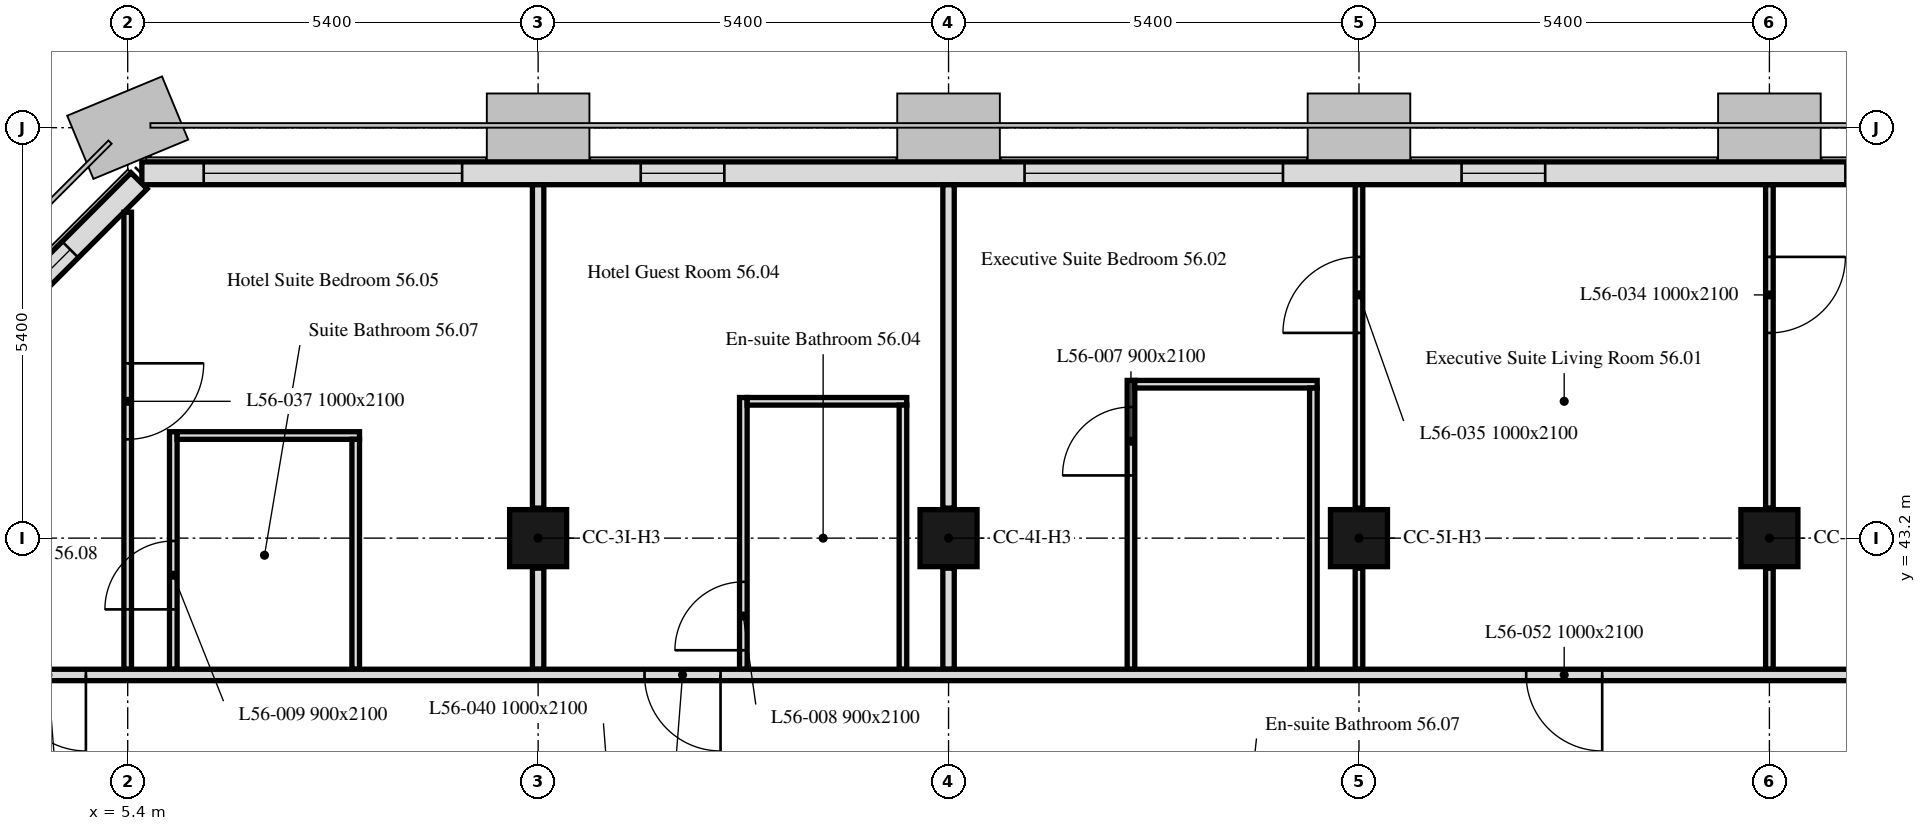
"""IFC4 building model, lengths in metres.
Left out: names, types, materials, properties, quantities, classifications, styles, units other than length and angle.
Written with IfcOpenShell. Run it as: python <this file> out.ifc"""

import sys

from ifc_helpers import new_model, si_unit, direction, frame, frame_2d, origin, origin_2d, place, context, subcontext, project, spatial, rectangle, extrude, element, fill, save


model = new_model("IFC4")
c1 = context("Model", 3, precision=1e-05, world=origin(), true_north=direction((0.0, 1.0)))
c2 = subcontext(c1, "Body", "Model", "MODEL_VIEW")
j1 = project(units=[si_unit("LENGTHUNIT", "METRE"), si_unit("PLANEANGLEUNIT", "RADIAN")], contexts=[c1])
p1 = place(None, origin())
s1 = spatial("IfcSite", under=j1, at=p1, CompositionType="ELEMENT")
p2 = place(p1, origin())
s2 = spatial("IfcBuilding", under=s1, at=p2, CompositionType="ELEMENT")
p3 = place(p2, frame((0.0, 0.0, 223.6)))
s3 = spatial("IfcBuildingStorey", under=s2, at=p3, CompositionType="ELEMENT", Elevation=223.6)
for number, where, z_axis, x_axis in (
    (1, (10.8, 43.2, 0.0), (0.0, 0.0, 1.0), (1.0, 0.0, 0.0)),
    (2, (16.2, 43.2, 0.0), (0.0, 0.0, 1.0), (1.0, 0.0, 0.0)),
    (3, (21.6, 43.2, 0.0), (0.0, 0.0, 1.0), (1.0, 0.0, 0.0)),
    (4, (27.0, 43.2, 0.0), (0.0, 0.0, 1.0), (1.0, 0.0, 0.0)),
):
    element("IfcColumn", number, at=place(p3, frame(where, z_axis=z_axis, x_axis=x_axis)), inside=s3, PredefinedType="COLUMN", context=c2, shape_type="SweptSolid", body=[
        extrude(rectangle(XDim=0.75, YDim=0.75, at=origin_2d()), origin(), (0.0, 0.0, 1.0), 3.0),
    ])
p4 = place(p3, frame((37.614, 48.0, 0.0), z_axis=(0.0, 0.0, 1.0), x_axis=(-1.0, 0.0, 0.0)))
e5 = element("IfcWall", 5, at=p4, inside=s3, PredefinedType="SOLIDWALL", context=c2, shape_type="SweptSolid", body=[
    extrude(rectangle(XDim=32.027, YDim=0.3, at=frame_2d((16.014, 0.0))), origin(), (0.0, 0.0, 1.0), 3.0),
])
p5 = place(p4, frame((2.764, 0.0, 0.9)))
e6 = element("IfcOpeningElement", 6, at=p5, cuts=e5, PredefinedType="OPENING", context=c2, shape_type="SweptSolid", body=[
    extrude(rectangle(XDim=1.1, YDim=1.7, at=frame_2d((0.55, 0.85))), frame((0.0, 0.16, 0.0), z_axis=(0.0, -1.0, 0.0), x_axis=(1.0, 0.0, 0.0)), (0.0, 0.0, 1.0), 0.32),
])
p6 = place(p4, frame((6.214, 0.0, 0.9)))
e7 = element("IfcOpeningElement", 7, at=p6, cuts=e5, PredefinedType="OPENING", context=c2, shape_type="SweptSolid", body=[
    extrude(rectangle(XDim=3.4, YDim=1.7, at=frame_2d((1.7, 0.85))), frame((0.0, 0.16, 0.0), z_axis=(0.0, -1.0, 0.0), x_axis=(1.0, 0.0, 0.0)), (0.0, 0.0, 1.0), 0.32),
])
p7 = place(p4, frame((13.564, 0.0, 0.9)))
e8 = element("IfcOpeningElement", 8, at=p7, cuts=e5, PredefinedType="OPENING", context=c2, shape_type="SweptSolid", body=[
    extrude(rectangle(XDim=1.1, YDim=1.7, at=frame_2d((0.55, 0.85))), frame((0.0, 0.16, 0.0), z_axis=(0.0, -1.0, 0.0), x_axis=(1.0, 0.0, 0.0)), (0.0, 0.0, 1.0), 0.32),
])
p8 = place(p4, frame((17.014, 0.0, 0.9)))
e9 = element("IfcOpeningElement", 9, at=p8, cuts=e5, PredefinedType="OPENING", context=c2, shape_type="SweptSolid", body=[
    extrude(rectangle(XDim=3.4, YDim=1.7, at=frame_2d((1.7, 0.85))), frame((0.0, 0.16, 0.0), z_axis=(0.0, -1.0, 0.0), x_axis=(1.0, 0.0, 0.0)), (0.0, 0.0, 1.0), 0.32),
])
p9 = place(p4, frame((24.364, 0.0, 0.9)))
e10 = element("IfcOpeningElement", 10, at=p9, cuts=e5, PredefinedType="OPENING", context=c2, shape_type="SweptSolid", body=[
    extrude(rectangle(XDim=1.1, YDim=1.7, at=frame_2d((0.55, 0.85))), frame((0.0, 0.16, 0.0), z_axis=(0.0, -1.0, 0.0), x_axis=(1.0, 0.0, 0.0)), (0.0, 0.0, 1.0), 0.32),
])
p10 = place(p4, frame((27.814, 0.0, 0.9)))
e11 = element("IfcOpeningElement", 11, at=p10, cuts=e5, PredefinedType="OPENING", context=c2, shape_type="SweptSolid", body=[
    extrude(rectangle(XDim=3.4, YDim=1.7, at=frame_2d((1.7, 0.85))), frame((0.0, 0.16, 0.0), z_axis=(0.0, -1.0, 0.0), x_axis=(1.0, 0.0, 0.0)), (0.0, 0.0, 1.0), 0.32),
])
p11 = place(p3, frame((5.55, 47.901, 0.0), z_axis=(0.0, 0.0, 1.0), x_axis=(-0.707106781187, -0.707106781187, 0.0)))
e12 = element("IfcWall", 12, at=p11, inside=s3, PredefinedType="SOLIDWALL", context=c2, shape_type="SweptSolid", body=[
    extrude(rectangle(XDim=6.86, YDim=0.3, at=frame_2d((3.43, 0.0))), origin(), (0.0, 0.0, 1.0), 3.0),
])
p12 = place(p11, frame((1.28, 0.0, 0.9)))
e13 = element("IfcOpeningElement", 13, at=p12, cuts=e12, PredefinedType="OPENING", context=c2, shape_type="SweptSolid", body=[
    extrude(rectangle(XDim=1.1, YDim=1.7, at=frame_2d((0.55, 0.85))), frame((0.0, 0.16, 0.0), z_axis=(0.0, -1.0, 0.0), x_axis=(1.0, 0.0, 0.0)), (0.0, 0.0, 1.0), 0.32),
])
p13 = place(p11, frame((4.48, 0.0, 0.9)))
e14 = element("IfcOpeningElement", 14, at=p13, cuts=e12, PredefinedType="OPENING", context=c2, shape_type="SweptSolid", body=[
    extrude(rectangle(XDim=1.1, YDim=1.7, at=frame_2d((0.55, 0.85))), frame((0.0, 0.16, 0.0), z_axis=(0.0, -1.0, 0.0), x_axis=(1.0, 0.0, 0.0)), (0.0, 0.0, 1.0), 0.32),
])
p14 = place(p3, frame((27.0, 47.849, 0.0), z_axis=(0.0, 0.0, 1.0), x_axis=(0.0, -1.0, 0.0)))
e15 = element("IfcWall", 15, at=p14, inside=s3, PredefinedType="PARTITIONING", context=c2, shape_type="SweptSolid", body=[
    extrude(rectangle(XDim=4.254, YDim=0.1, at=frame_2d((2.127, 0.0))), origin(), (0.0, 0.0, 1.0), 2.4),
])
p15 = place(p14, frame((0.949, 0.0, 0.0)))
e16 = element("IfcOpeningElement", 16, at=p15, cuts=e15, PredefinedType="OPENING", context=c2, shape_type="SweptSolid", body=[
    extrude(rectangle(XDim=1.0, YDim=2.1, at=frame_2d((0.5, 1.05))), frame((0.0, 0.05, 0.0), z_axis=(0.0, -1.0, 0.0), x_axis=(1.0, 0.0, 0.0)), (0.0, 0.0, 1.0), 0.1),
])
p16 = place(p3, frame((27.0, 42.805, 0.0), z_axis=(0.0, 0.0, 1.0), x_axis=(0.0, -1.0, 0.0)))
e17 = element("IfcWall", 17, at=p16, inside=s3, PredefinedType="PARTITIONING", context=c2, shape_type="SweptSolid", body=[
    extrude(rectangle(XDim=1.33, YDim=0.1, at=frame_2d((0.665, 0.0))), origin(), (0.0, 0.0, 1.0), 2.4),
])
p17 = place(p3, frame((16.2, 47.849, 0.0), z_axis=(0.0, 0.0, 1.0), x_axis=(0.0, -1.0, 0.0)))
e18 = element("IfcWall", 18, at=p17, inside=s3, PredefinedType="PARTITIONING", context=c2, shape_type="SweptSolid", body=[
    extrude(rectangle(XDim=4.254, YDim=0.15, at=frame_2d((2.127, 0.0))), origin(), (0.0, 0.0, 1.0), 2.4),
])
p18 = place(p3, frame((16.2, 42.805, 0.0), z_axis=(0.0, 0.0, 1.0), x_axis=(0.0, -1.0, 0.0)))
e19 = element("IfcWall", 19, at=p18, inside=s3, PredefinedType="PARTITIONING", context=c2, shape_type="SweptSolid", body=[
    extrude(rectangle(XDim=1.33, YDim=0.15, at=frame_2d((0.665, 0.0))), origin(), (0.0, 0.0, 1.0), 2.4),
])
p19 = place(p3, frame((18.6, 41.475, 0.0), z_axis=(0.0, 0.0, 1.0), x_axis=(0.0, 1.0, 0.0)))
e20 = element("IfcWall", 20, at=p19, inside=s3, PredefinedType="PARTITIONING", context=c2, shape_type="SweptSolid", body=[
    extrude(rectangle(XDim=3.8, YDim=0.1, at=frame_2d((1.9, 0.0))), origin(), (0.0, 0.0, 1.0), 3.0),
])
p20 = place(p19, frame((2.55, 0.0, 0.0)))
e21 = element("IfcOpeningElement", 21, at=p20, cuts=e20, PredefinedType="OPENING", context=c2, shape_type="SweptSolid", body=[
    extrude(rectangle(XDim=0.9, YDim=2.1, at=frame_2d((0.45, 1.05))), frame((0.0, 0.05, 0.0), z_axis=(0.0, -1.0, 0.0), x_axis=(1.0, 0.0, 0.0)), (0.0, 0.0, 1.0), 0.1),
])
p21 = place(p3, frame((18.65, 45.225, 0.0), z_axis=(0.0, 0.0, 1.0), x_axis=(1.0, 0.0, 0.0)))
e22 = element("IfcWall", 22, at=p21, inside=s3, PredefinedType="PARTITIONING", context=c2, shape_type="SweptSolid", body=[
    extrude(rectangle(XDim=2.4, YDim=0.1, at=frame_2d((1.2, 0.0))), origin(), (0.0, 0.0, 1.0), 3.0),
])
p22 = place(p3, frame((21.0, 45.175, 0.0), z_axis=(0.0, 0.0, 1.0), x_axis=(0.0, -1.0, 0.0)))
e23 = element("IfcWall", 23, at=p22, inside=s3, PredefinedType="PARTITIONING", context=c2, shape_type="SweptSolid", body=[
    extrude(rectangle(XDim=3.7, YDim=0.1, at=frame_2d((1.85, 0.0))), origin(), (0.0, 0.0, 1.0), 3.0),
])
p23 = place(p3, frame((21.6, 41.475, 0.0), z_axis=(0.0, 0.0, 1.0), x_axis=(0.0, 1.0, 0.0)))
e24 = element("IfcWall", 24, at=p23, inside=s3, PredefinedType="PARTITIONING", context=c2, shape_type="SweptSolid", body=[
    extrude(rectangle(XDim=1.33, YDim=0.1, at=frame_2d((0.665, 0.0))), origin(), (0.0, 0.0, 1.0), 2.4),
])
p24 = place(p3, frame((21.6, 43.595, 0.0), z_axis=(0.0, 0.0, 1.0), x_axis=(0.0, 1.0, 0.0)))
e25 = element("IfcWall", 25, at=p24, inside=s3, PredefinedType="PARTITIONING", context=c2, shape_type="SweptSolid", body=[
    extrude(rectangle(XDim=4.254, YDim=0.1, at=frame_2d((2.127, 0.0))), origin(), (0.0, 0.0, 1.0), 2.4),
])
p25 = place(p24, frame((2.305, 0.0, 0.0)))
e26 = element("IfcOpeningElement", 26, at=p25, cuts=e25, PredefinedType="OPENING", context=c2, shape_type="SweptSolid", body=[
    extrude(rectangle(XDim=1.0, YDim=2.1, at=frame_2d((0.5, 1.05))), frame((0.0, 0.05, 0.0), z_axis=(0.0, -1.0, 0.0), x_axis=(1.0, 0.0, 0.0)), (0.0, 0.0, 1.0), 0.1),
])
p26 = place(p3, frame((10.8, 47.849, 0.0), z_axis=(0.0, 0.0, 1.0), x_axis=(0.0, -1.0, 0.0)))
e27 = element("IfcWall", 27, at=p26, inside=s3, PredefinedType="PARTITIONING", context=c2, shape_type="SweptSolid", body=[
    extrude(rectangle(XDim=4.254, YDim=0.15, at=frame_2d((2.127, 0.0))), origin(), (0.0, 0.0, 1.0), 2.4),
])
p27 = place(p3, frame((10.8, 42.805, 0.0), z_axis=(0.0, 0.0, 1.0), x_axis=(0.0, -1.0, 0.0)))
e28 = element("IfcWall", 28, at=p27, inside=s3, PredefinedType="PARTITIONING", context=c2, shape_type="SweptSolid", body=[
    extrude(rectangle(XDim=1.33, YDim=0.15, at=frame_2d((0.665, 0.0))), origin(), (0.0, 0.0, 1.0), 2.4),
])
p28 = place(p3, frame((13.5, 41.475, 0.0), z_axis=(0.0, 0.0, 1.0), x_axis=(0.0, 1.0, 0.0)))
e29 = element("IfcWall", 29, at=p28, inside=s3, PredefinedType="PARTITIONING", context=c2, shape_type="SweptSolid", body=[
    extrude(rectangle(XDim=3.575, YDim=0.1, at=frame_2d((1.788, 0.0))), origin(), (0.0, 0.0, 1.0), 3.0),
])
p29 = place(p28, frame((0.25, 0.0, 0.0)))
e30 = element("IfcOpeningElement", 30, at=p29, cuts=e29, PredefinedType="OPENING", context=c2, shape_type="SweptSolid", body=[
    extrude(rectangle(XDim=0.9, YDim=2.1, at=frame_2d((0.45, 1.05))), frame((0.0, 0.05, 0.0), z_axis=(0.0, -1.0, 0.0), x_axis=(1.0, 0.0, 0.0)), (0.0, 0.0, 1.0), 0.1),
])
p30 = place(p3, frame((13.55, 45.0, 0.0), z_axis=(0.0, 0.0, 1.0), x_axis=(1.0, 0.0, 0.0)))
e31 = element("IfcWall", 31, at=p30, inside=s3, PredefinedType="PARTITIONING", context=c2, shape_type="SweptSolid", body=[
    extrude(rectangle(XDim=2.1, YDim=0.1, at=frame_2d((1.05, 0.0))), origin(), (0.0, 0.0, 1.0), 3.0),
])
p31 = place(p3, frame((15.6, 44.95, 0.0), z_axis=(0.0, 0.0, 1.0), x_axis=(0.0, -1.0, 0.0)))
e32 = element("IfcWall", 32, at=p31, inside=s3, PredefinedType="PARTITIONING", context=c2, shape_type="SweptSolid", body=[
    extrude(rectangle(XDim=3.475, YDim=0.1, at=frame_2d((1.737, 0.0))), origin(), (0.0, 0.0, 1.0), 3.0),
])
p32 = place(p3, frame((5.4, 47.488, 0.0), z_axis=(0.0, 0.0, 1.0), x_axis=(0.0, -1.0, 0.0)))
e33 = element("IfcWall", 33, at=p32, inside=s3, PredefinedType="PARTITIONING", context=c2, shape_type="SweptSolid", body=[
    extrude(rectangle(XDim=6.013, YDim=0.1, at=frame_2d((3.006, 0.0))), origin(), (0.0, 0.0, 1.0), 3.0),
])
p33 = place(p32, frame((1.988, 0.0, 0.0)))
e34 = element("IfcOpeningElement", 34, at=p33, cuts=e33, PredefinedType="OPENING", context=c2, shape_type="SweptSolid", body=[
    extrude(rectangle(XDim=1.0, YDim=2.1, at=frame_2d((0.5, 1.05))), frame((0.0, 0.05, 0.0), z_axis=(0.0, -1.0, 0.0), x_axis=(1.0, 0.0, 0.0)), (0.0, 0.0, 1.0), 0.1),
])
p34 = place(p3, frame((6.0, 41.475, 0.0), z_axis=(0.0, 0.0, 1.0), x_axis=(0.0, 1.0, 0.0)))
e35 = element("IfcWall", 35, at=p34, inside=s3, PredefinedType="PARTITIONING", context=c2, shape_type="SweptSolid", body=[
    extrude(rectangle(XDim=3.125, YDim=0.1, at=frame_2d((1.562, 0.0))), origin(), (0.0, 0.0, 1.0), 3.0),
])
p35 = place(p34, frame((0.788, 0.0, 0.0)))
e36 = element("IfcOpeningElement", 36, at=p35, cuts=e35, PredefinedType="OPENING", context=c2, shape_type="SweptSolid", body=[
    extrude(rectangle(XDim=0.9, YDim=2.1, at=frame_2d((0.45, 1.05))), frame((0.0, 0.05, 0.0), z_axis=(0.0, -1.0, 0.0), x_axis=(1.0, 0.0, 0.0)), (0.0, 0.0, 1.0), 0.1),
])
p36 = place(p3, frame((6.05, 44.55, 0.0), z_axis=(0.0, 0.0, 1.0), x_axis=(1.0, 0.0, 0.0)))
e37 = element("IfcWall", 37, at=p36, inside=s3, PredefinedType="PARTITIONING", context=c2, shape_type="SweptSolid", body=[
    extrude(rectangle(XDim=2.4, YDim=0.1, at=frame_2d((1.2, 0.0))), origin(), (0.0, 0.0, 1.0), 3.0),
])
p37 = place(p3, frame((8.4, 44.5, 0.0), z_axis=(0.0, 0.0, 1.0), x_axis=(0.0, -1.0, 0.0)))
e38 = element("IfcWall", 38, at=p37, inside=s3, PredefinedType="PARTITIONING", context=c2, shape_type="SweptSolid", body=[
    extrude(rectangle(XDim=3.025, YDim=0.1, at=frame_2d((1.512, 0.0))), origin(), (0.0, 0.0, 1.0), 3.0),
])
p38 = place(p3, frame((42.449, 41.4, 0.0), z_axis=(0.0, 0.0, 1.0), x_axis=(-1.0, 0.0, 0.0)))
e39 = element("IfcWall", 39, at=p38, inside=s3, PredefinedType="PARTITIONING", context=c2, shape_type="SweptSolid", body=[
    extrude(rectangle(XDim=41.698, YDim=0.15, at=frame_2d((20.849, 0.0))), origin(), (0.0, 0.0, 1.0), 2.4),
])
p39 = place(p38, frame((1.449, 0.0, 0.0)))
e40 = element("IfcOpeningElement", 40, at=p39, cuts=e39, PredefinedType="OPENING", context=c2, shape_type="SweptSolid", body=[
    extrude(rectangle(XDim=1.0, YDim=2.1, at=frame_2d((0.5, 1.05))), frame((0.0, 0.075, 0.0), z_axis=(0.0, -1.0, 0.0), x_axis=(1.0, 0.0, 0.0)), (0.0, 0.0, 1.0), 0.15),
])
p40 = place(p38, frame((29.249, 0.0, 0.0)))
e41 = element("IfcOpeningElement", 41, at=p40, cuts=e39, PredefinedType="OPENING", context=c2, shape_type="SweptSolid", body=[
    extrude(rectangle(XDim=1.0, YDim=2.1, at=frame_2d((0.5, 1.05))), frame((0.0, 0.075, 0.0), z_axis=(0.0, -1.0, 0.0), x_axis=(1.0, 0.0, 0.0)), (0.0, 0.0, 1.0), 0.15),
])
p41 = place(p38, frame((37.599, 0.0, 0.0)))
e42 = element("IfcOpeningElement", 42, at=p41, cuts=e39, PredefinedType="OPENING", context=c2, shape_type="SweptSolid", body=[
    extrude(rectangle(XDim=1.0, YDim=2.1, at=frame_2d((0.5, 1.05))), frame((0.0, 0.075, 0.0), z_axis=(0.0, -1.0, 0.0), x_axis=(1.0, 0.0, 0.0)), (0.0, 0.0, 1.0), 0.15),
])
p42 = place(p38, frame((17.649, 0.0, 0.0)))
e43 = element("IfcOpeningElement", 43, at=p42, cuts=e39, PredefinedType="OPENING", context=c2, shape_type="SweptSolid", body=[
    extrude(rectangle(XDim=1.0, YDim=2.1, at=frame_2d((0.5, 1.05))), frame((0.0, 0.075, 0.0), z_axis=(0.0, -1.0, 0.0), x_axis=(1.0, 0.0, 0.0)), (0.0, 0.0, 1.0), 0.15),
])
p43 = place(p7, origin())
e44 = element("IfcWindow", 44, at=p43, inside=s3, PartitioningType="SINGLE_PANEL", PredefinedType="WINDOW", context=c2, shape_type="SweptSolid", body=[
    extrude(rectangle(XDim=1.1, YDim=1.7, at=frame_2d((0.55, 0.85))), frame((0.0, 0.03, 0.0), z_axis=(0.0, -1.0, 0.0), x_axis=(1.0, 0.0, 0.0)), (0.0, 0.0, 1.0), 0.06),
])
fill(e8, e44)
p44 = place(p8, origin())
e45 = element("IfcWindow", 45, at=p44, inside=s3, PartitioningType="SINGLE_PANEL", PredefinedType="WINDOW", context=c2, shape_type="SweptSolid", body=[
    extrude(rectangle(XDim=3.4, YDim=1.7, at=frame_2d((1.7, 0.85))), frame((0.0, 0.03, 0.0), z_axis=(0.0, -1.0, 0.0), x_axis=(1.0, 0.0, 0.0)), (0.0, 0.0, 1.0), 0.06),
])
fill(e9, e45)
p45 = place(p9, origin())
e46 = element("IfcWindow", 46, at=p45, inside=s3, PartitioningType="SINGLE_PANEL", PredefinedType="WINDOW", context=c2, shape_type="SweptSolid", body=[
    extrude(rectangle(XDim=1.1, YDim=1.7, at=frame_2d((0.55, 0.85))), frame((0.0, 0.03, 0.0), z_axis=(0.0, -1.0, 0.0), x_axis=(1.0, 0.0, 0.0)), (0.0, 0.0, 1.0), 0.06),
])
fill(e10, e46)
p46 = place(p10, origin())
e47 = element("IfcWindow", 47, at=p46, inside=s3, PartitioningType="SINGLE_PANEL", PredefinedType="WINDOW", context=c2, shape_type="SweptSolid", body=[
    extrude(rectangle(XDim=3.4, YDim=1.7, at=frame_2d((1.7, 0.85))), frame((0.0, 0.03, 0.0), z_axis=(0.0, -1.0, 0.0), x_axis=(1.0, 0.0, 0.0)), (0.0, 0.0, 1.0), 0.06),
])
fill(e11, e47)
p47 = place(p12, origin())
e48 = element("IfcWindow", 48, at=p47, inside=s3, PartitioningType="SINGLE_PANEL", PredefinedType="WINDOW", context=c2, shape_type="SweptSolid", body=[
    extrude(rectangle(XDim=1.1, YDim=1.7, at=frame_2d((0.55, 0.85))), frame((0.0, 0.03, 0.0), z_axis=(0.0, -1.0, 0.0), x_axis=(1.0, 0.0, 0.0)), (0.0, 0.0, 1.0), 0.06),
])
fill(e13, e48)
p48 = place(p20, origin())
e49 = element("IfcDoor", 49, at=p48, inside=s3, OperationType="SINGLE_SWING_LEFT", PredefinedType="DOOR", context=c2, shape_type="SweptSolid", body=[
    extrude(rectangle(XDim=0.9, YDim=2.1, at=frame_2d((0.45, 1.05))), frame((0.0, 0.025, 0.0), z_axis=(0.0, -1.0, 0.0), x_axis=(1.0, 0.0, 0.0)), (0.0, 0.0, 1.0), 0.05),
])
fill(e21, e49)
p49 = place(p29, origin())
e50 = element("IfcDoor", 50, at=p49, inside=s3, OperationType="SINGLE_SWING_LEFT", PredefinedType="DOOR", context=c2, shape_type="SweptSolid", body=[
    extrude(rectangle(XDim=0.9, YDim=2.1, at=frame_2d((0.45, 1.05))), frame((0.0, 0.025, 0.0), z_axis=(0.0, -1.0, 0.0), x_axis=(1.0, 0.0, 0.0)), (0.0, 0.0, 1.0), 0.05),
])
fill(e30, e50)
p50 = place(p35, origin())
e51 = element("IfcDoor", 51, at=p50, inside=s3, OperationType="SINGLE_SWING_LEFT", PredefinedType="DOOR", context=c2, shape_type="SweptSolid", body=[
    extrude(rectangle(XDim=0.9, YDim=2.1, at=frame_2d((0.45, 1.05))), frame((0.0, 0.025, 0.0), z_axis=(0.0, -1.0, 0.0), x_axis=(1.0, 0.0, 0.0)), (0.0, 0.0, 1.0), 0.05),
])
fill(e36, e51)
p51 = place(p15, origin())
e52 = element("IfcDoor", 52, at=p51, inside=s3, OperationType="SINGLE_SWING_RIGHT", PredefinedType="DOOR", context=c2, shape_type="SweptSolid", body=[
    extrude(rectangle(XDim=1.0, YDim=2.1, at=frame_2d((0.5, 1.05))), frame((0.0, 0.025, 0.0), z_axis=(0.0, -1.0, 0.0), x_axis=(1.0, 0.0, 0.0)), (0.0, 0.0, 1.0), 0.05),
])
fill(e16, e52)
p52 = place(p25, origin())
e53 = element("IfcDoor", 53, at=p52, inside=s3, OperationType="SINGLE_SWING_RIGHT", PredefinedType="DOOR", context=c2, shape_type="SweptSolid", body=[
    extrude(rectangle(XDim=1.0, YDim=2.1, at=frame_2d((0.5, 1.05))), frame((0.0, 0.025, 0.0), z_axis=(0.0, -1.0, 0.0), x_axis=(1.0, 0.0, 0.0)), (0.0, 0.0, 1.0), 0.05),
])
fill(e26, e53)
p53 = place(p40, origin())
e54 = element("IfcDoor", 54, at=p53, inside=s3, OperationType="SINGLE_SWING_LEFT", PredefinedType="DOOR", context=c2, shape_type="SweptSolid", body=[
    extrude(rectangle(XDim=1.0, YDim=2.1, at=frame_2d((0.5, 1.05))), frame((0.0, 0.025, 0.0), z_axis=(0.0, -1.0, 0.0), x_axis=(1.0, 0.0, 0.0)), (0.0, 0.0, 1.0), 0.05),
])
fill(e41, e54)
p54 = place(p33, origin())
e55 = element("IfcDoor", 55, at=p54, inside=s3, OperationType="SINGLE_SWING_LEFT", PredefinedType="DOOR", context=c2, shape_type="SweptSolid", body=[
    extrude(rectangle(XDim=1.0, YDim=2.1, at=frame_2d((0.5, 1.05))), frame((0.0, 0.025, 0.0), z_axis=(0.0, -1.0, 0.0), x_axis=(1.0, 0.0, 0.0)), (0.0, 0.0, 1.0), 0.05),
])
fill(e34, e55)
p55 = place(p41, origin())
e56 = element("IfcDoor", 56, at=p55, inside=s3, OperationType="SINGLE_SWING_LEFT", PredefinedType="DOOR", context=c2, shape_type="SweptSolid", body=[
    extrude(rectangle(XDim=1.0, YDim=2.1, at=frame_2d((0.5, 1.05))), frame((0.0, 0.025, 0.0), z_axis=(0.0, -1.0, 0.0), x_axis=(1.0, 0.0, 0.0)), (0.0, 0.0, 1.0), 0.05),
])
fill(e42, e56)
p56 = place(p42, origin())
e57 = element("IfcDoor", 57, at=p56, inside=s3, OperationType="SINGLE_SWING_RIGHT", PredefinedType="DOOR", context=c2, shape_type="SweptSolid", body=[
    extrude(rectangle(XDim=1.0, YDim=2.1, at=frame_2d((0.5, 1.05))), frame((0.0, 0.025, 0.0), z_axis=(0.0, -1.0, 0.0), x_axis=(1.0, 0.0, 0.0)), (0.0, 0.0, 1.0), 0.05),
])
fill(e43, e57)
save(model, sys.argv[1])
